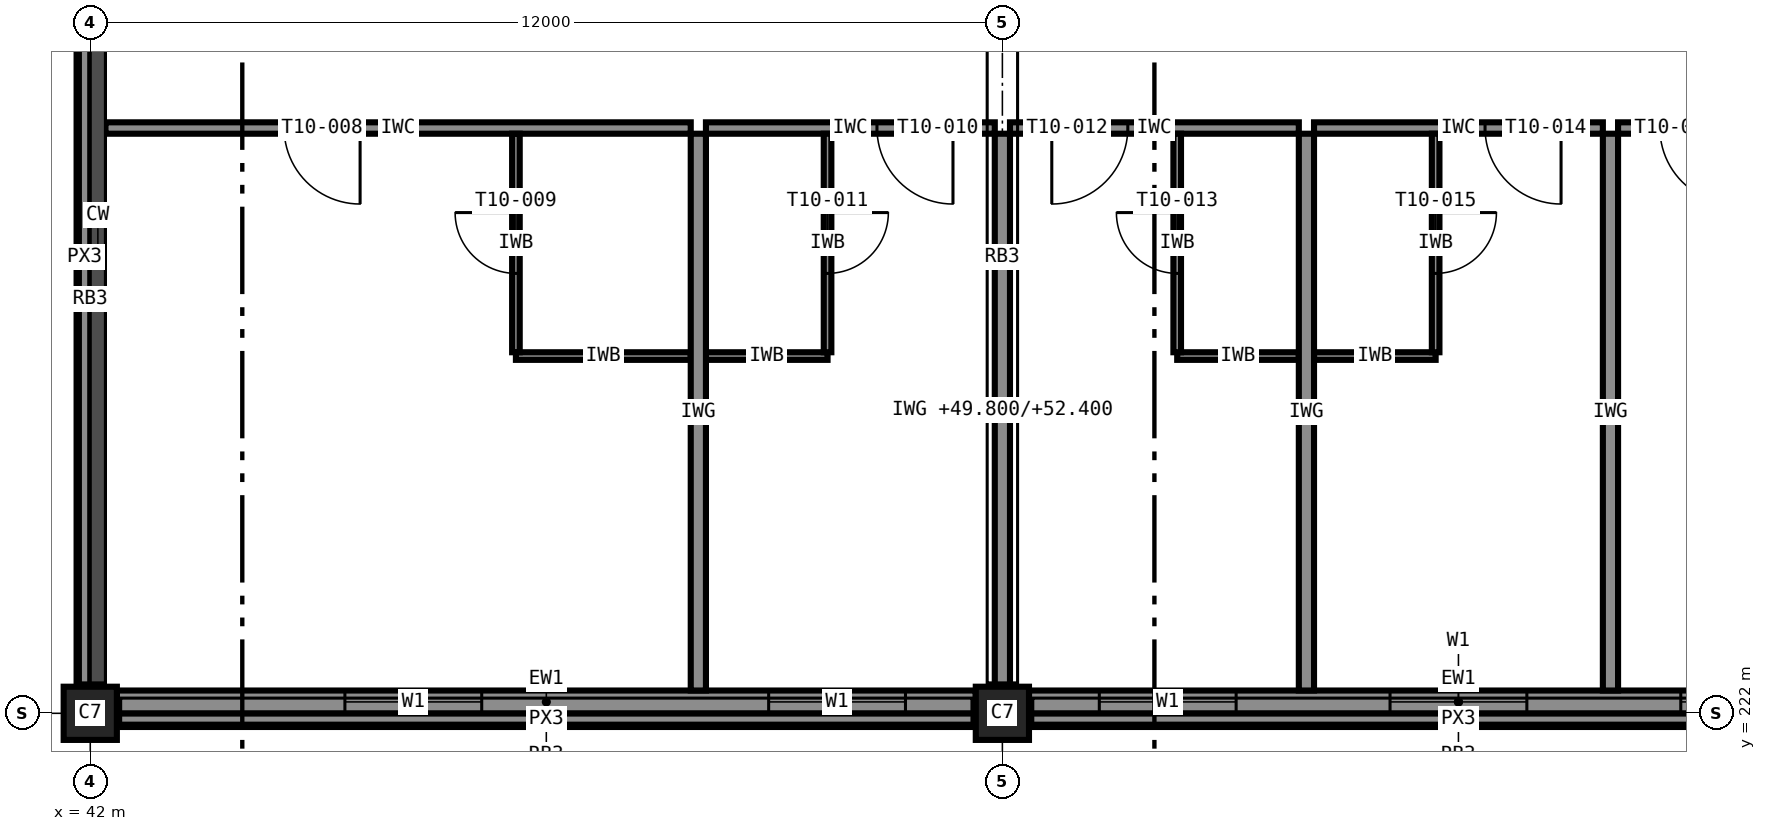
"""IFC4 building model, lengths in metres.
Left out: names, types, materials, properties, quantities, classifications, styles, units other than length and angle.
Written with IfcOpenShell. Run it as: python <this file> out.ifc"""

import sys

from ifc_helpers import new_model, si_unit, direction, frame, frame_2d, origin, origin_2d, place, context, subcontext, project, spatial, rectangle, extrude, element, fill, save


model = new_model("IFC4")
c1 = context("Model", 3, precision=1e-05, world=origin(), true_north=direction((0.0, 1.0)))
c2 = subcontext(c1, "Body", "Model", "MODEL_VIEW")
j1 = project(units=[si_unit("LENGTHUNIT", "METRE"), si_unit("PLANEANGLEUNIT", "RADIAN")], contexts=[c1])
p1 = place(None, origin())
s1 = spatial("IfcSite", under=j1, at=p1, CompositionType="ELEMENT")
p2 = place(p1, origin())
s2 = spatial("IfcBuilding", under=s1, at=p2, CompositionType="ELEMENT")
p3 = place(p2, frame((0.0, 0.0, 49.8)))
s3 = spatial("IfcBuildingStorey", under=s2, at=p3, CompositionType="ELEMENT", Elevation=49.8)
for number, where, z_axis, x_axis in (
    (1, (42.0, 222.0, 0.0), (0.0, 0.0, 1.0), (1.0, 0.0, 0.0)),
    (2, (54.0, 222.0, 0.0), (0.0, 0.0, 1.0), (1.0, 0.0, 0.0)),
):
    element("IfcColumn", number, at=place(p3, frame(where, z_axis=z_axis, x_axis=x_axis)), inside=s3, PredefinedType="COLUMN", context=c2, shape_type="SweptSolid", body=[
        extrude(rectangle(XDim=0.7, YDim=0.7, at=origin_2d()), origin(), (0.0, 0.0, 1.0), 3.6),
    ])
p4 = place(p3, frame((42.35, 222.15, 0.0), z_axis=(0.0, 0.0, 1.0), x_axis=(1.0, 0.0, 0.0)))
e3 = element("IfcWall", 3, at=p4, inside=s3, PredefinedType="STANDARD", context=c2, shape_type="SweptSolid", body=[
    extrude(rectangle(XDim=11.3, YDim=0.3, at=frame_2d((5.65, 0.0))), origin(), (0.0, 0.0, 1.0), 2.6),
])
p5 = place(p4, frame((3.0, 0.0, 0.85)))
e4 = element("IfcOpeningElement", 4, at=p5, cuts=e3, PredefinedType="OPENING", context=c2, shape_type="SweptSolid", body=[
    extrude(rectangle(XDim=1.8, YDim=1.75, at=frame_2d((0.9, 0.875))), frame((0.0, 0.16, 0.0), z_axis=(0.0, -1.0, 0.0), x_axis=(1.0, 0.0, 0.0)), (0.0, 0.0, 1.0), 0.32),
])
p6 = place(p4, frame((8.575, 0.0, 0.85)))
e5 = element("IfcOpeningElement", 5, at=p6, cuts=e3, PredefinedType="OPENING", context=c2, shape_type="SweptSolid", body=[
    extrude(rectangle(XDim=1.8, YDim=1.75, at=frame_2d((0.9, 0.875))), frame((0.0, 0.16, 0.0), z_axis=(0.0, -1.0, 0.0), x_axis=(1.0, 0.0, 0.0)), (0.0, 0.0, 1.0), 0.32),
])
p7 = place(p3, frame((54.35, 222.15, 0.0), z_axis=(0.0, 0.0, 1.0), x_axis=(1.0, 0.0, 0.0)))
e6 = element("IfcWall", 6, at=p7, inside=s3, PredefinedType="STANDARD", context=c2, shape_type="SweptSolid", body=[
    extrude(rectangle(XDim=11.3, YDim=0.3, at=frame_2d((5.65, 0.0))), origin(), (0.0, 0.0, 1.0), 2.6),
])
p8 = place(p7, frame((0.925, 0.0, 0.85)))
e7 = element("IfcOpeningElement", 7, at=p8, cuts=e6, PredefinedType="OPENING", context=c2, shape_type="SweptSolid", body=[
    extrude(rectangle(XDim=1.8, YDim=1.75, at=frame_2d((0.9, 0.875))), frame((0.0, 0.16, 0.0), z_axis=(0.0, -1.0, 0.0), x_axis=(1.0, 0.0, 0.0)), (0.0, 0.0, 1.0), 0.32),
])
p9 = place(p7, frame((4.75, 0.0, 0.85)))
e8 = element("IfcOpeningElement", 8, at=p9, cuts=e6, PredefinedType="OPENING", context=c2, shape_type="SweptSolid", body=[
    extrude(rectangle(XDim=1.8, YDim=1.75, at=frame_2d((0.9, 0.875))), frame((0.0, 0.16, 0.0), z_axis=(0.0, -1.0, 0.0), x_axis=(1.0, 0.0, 0.0)), (0.0, 0.0, 1.0), 0.32),
])
p10 = place(p7, frame((8.575, 0.0, 0.85)))
e9 = element("IfcOpeningElement", 9, at=p10, cuts=e6, PredefinedType="OPENING", context=c2, shape_type="SweptSolid", body=[
    extrude(rectangle(XDim=1.8, YDim=1.75, at=frame_2d((0.9, 0.875))), frame((0.0, 0.16, 0.0), z_axis=(0.0, -1.0, 0.0), x_axis=(1.0, 0.0, 0.0)), (0.0, 0.0, 1.0), 0.32),
])
for number, where, z_axis, x_axis in (
    (10, (42.35, 221.925, 3.4), (0.0, 0.0, 1.0), (1.0, 0.0, 0.0)),
    (11, (54.35, 221.925, 3.4), (0.0, 0.0, 1.0), (1.0, 0.0, 0.0)),
    (12, (41.925, 233.65, 3.4), (0.0, 0.0, 1.0), (0.0, -1.0, 0.0)),
):
    element("IfcWall", number, at=place(p3, frame(where, z_axis=z_axis, x_axis=x_axis)), inside=s3, PredefinedType="STANDARD", context=c2, shape_type="SweptSolid", body=[
        extrude(rectangle(XDim=11.3, YDim=0.15, at=frame_2d((5.65, 0.0))), origin(), (0.0, 0.0, 1.0), 0.2),
    ])
p11 = place(p3, frame((49.9, 229.7, 0.0), z_axis=(0.0, 0.0, 1.0), x_axis=(-1.0, 0.0, 0.0)))
e13 = element("IfcWall", 13, at=p11, inside=s3, PredefinedType="PARTITIONING", context=c2, shape_type="SweptSolid", body=[
    extrude(rectangle(XDim=7.7, YDim=0.15, at=frame_2d((3.85, 0.0))), origin(), (0.0, 0.0, 1.0), 3.4),
])
p12 = place(p11, frame((4.35, 0.0, 0.0)))
e14 = element("IfcOpeningElement", 14, at=p12, cuts=e13, PredefinedType="OPENING", context=c2, shape_type="SweptSolid", body=[
    extrude(rectangle(XDim=1.0, YDim=2.1, at=frame_2d((0.5, 1.05))), frame((0.0, 0.085, 0.0), z_axis=(0.0, -1.0, 0.0), x_axis=(1.0, 0.0, 0.0)), (0.0, 0.0, 1.0), 0.17),
])
p13 = place(p3, frame((47.6, 226.7, 0.0), z_axis=(0.0, 0.0, 1.0), x_axis=(1.0, 0.0, 0.0)))
e15 = element("IfcWall", 15, at=p13, inside=s3, PredefinedType="PARTITIONING", context=c2, shape_type="SweptSolid", body=[
    extrude(rectangle(XDim=2.3, YDim=0.1, at=frame_2d((1.15, 0.0))), origin(), (0.0, 0.0, 1.0), 3.4),
])
p14 = place(p3, frame((47.6, 226.75, 0.0), z_axis=(0.0, 0.0, 1.0), x_axis=(0.0, 1.0, 0.0)))
e16 = element("IfcWall", 16, at=p14, inside=s3, PredefinedType="PARTITIONING", context=c2, shape_type="SweptSolid", body=[
    extrude(rectangle(XDim=2.875, YDim=0.1, at=frame_2d((1.438, 0.0))), origin(), (0.0, 0.0, 1.0), 3.4),
])
p15 = place(p14, frame((1.038, 0.0, 0.0)))
e17 = element("IfcOpeningElement", 17, at=p15, cuts=e16, PredefinedType="OPENING", context=c2, shape_type="SweptSolid", body=[
    extrude(rectangle(XDim=0.8, YDim=2.1, at=frame_2d((0.4, 1.05))), frame((0.0, 0.06, 0.0), z_axis=(0.0, -1.0, 0.0), x_axis=(1.0, 0.0, 0.0)), (0.0, 0.0, 1.0), 0.12),
])
p16 = place(p3, frame((53.9, 229.7, 0.0), z_axis=(0.0, 0.0, 1.0), x_axis=(-1.0, 0.0, 0.0)))
e18 = element("IfcWall", 18, at=p16, inside=s3, PredefinedType="PARTITIONING", context=c2, shape_type="SweptSolid", body=[
    extrude(rectangle(XDim=3.8, YDim=0.15, at=frame_2d((1.9, 0.0))), origin(), (0.0, 0.0, 1.0), 3.4),
])
p17 = place(p16, frame((0.55, 0.0, 0.0)))
e19 = element("IfcOpeningElement", 19, at=p17, cuts=e18, PredefinedType="OPENING", context=c2, shape_type="SweptSolid", body=[
    extrude(rectangle(XDim=1.0, YDim=2.1, at=frame_2d((0.5, 1.05))), frame((0.0, 0.085, 0.0), z_axis=(0.0, -1.0, 0.0), x_axis=(1.0, 0.0, 0.0)), (0.0, 0.0, 1.0), 0.17),
])
p18 = place(p3, frame((50.1, 226.7, 0.0), z_axis=(0.0, 0.0, 1.0), x_axis=(1.0, 0.0, 0.0)))
e20 = element("IfcWall", 20, at=p18, inside=s3, PredefinedType="PARTITIONING", context=c2, shape_type="SweptSolid", body=[
    extrude(rectangle(XDim=1.6, YDim=0.1, at=frame_2d((0.8, 0.0))), origin(), (0.0, 0.0, 1.0), 3.4),
])
p19 = place(p3, frame((51.7, 229.625, 0.0), z_axis=(0.0, 0.0, 1.0), x_axis=(0.0, -1.0, 0.0)))
e21 = element("IfcWall", 21, at=p19, inside=s3, PredefinedType="PARTITIONING", context=c2, shape_type="SweptSolid", body=[
    extrude(rectangle(XDim=2.875, YDim=0.1, at=frame_2d((1.438, 0.0))), origin(), (0.0, 0.0, 1.0), 3.4),
])
p20 = place(p19, frame((1.038, 0.0, 0.0)))
e22 = element("IfcOpeningElement", 22, at=p20, cuts=e21, PredefinedType="OPENING", context=c2, shape_type="SweptSolid", body=[
    extrude(rectangle(XDim=0.8, YDim=2.1, at=frame_2d((0.4, 1.05))), frame((0.0, 0.06, 0.0), z_axis=(0.0, -1.0, 0.0), x_axis=(1.0, 0.0, 0.0)), (0.0, 0.0, 1.0), 0.12),
])
p21 = place(p3, frame((57.9, 229.7, 0.0), z_axis=(0.0, 0.0, 1.0), x_axis=(-1.0, 0.0, 0.0)))
e23 = element("IfcWall", 23, at=p21, inside=s3, PredefinedType="PARTITIONING", context=c2, shape_type="SweptSolid", body=[
    extrude(rectangle(XDim=3.8, YDim=0.15, at=frame_2d((1.9, 0.0))), origin(), (0.0, 0.0, 1.0), 3.4),
])
p22 = place(p21, frame((2.25, 0.0, 0.0)))
e24 = element("IfcOpeningElement", 24, at=p22, cuts=e23, PredefinedType="OPENING", context=c2, shape_type="SweptSolid", body=[
    extrude(rectangle(XDim=1.0, YDim=2.1, at=frame_2d((0.5, 1.05))), frame((0.0, 0.085, 0.0), z_axis=(0.0, -1.0, 0.0), x_axis=(1.0, 0.0, 0.0)), (0.0, 0.0, 1.0), 0.17),
])
p23 = place(p3, frame((56.3, 226.7, 0.0), z_axis=(0.0, 0.0, 1.0), x_axis=(1.0, 0.0, 0.0)))
e25 = element("IfcWall", 25, at=p23, inside=s3, PredefinedType="PARTITIONING", context=c2, shape_type="SweptSolid", body=[
    extrude(rectangle(XDim=1.6, YDim=0.1, at=frame_2d((0.8, 0.0))), origin(), (0.0, 0.0, 1.0), 3.4),
])
p24 = place(p3, frame((56.3, 226.75, 0.0), z_axis=(0.0, 0.0, 1.0), x_axis=(0.0, 1.0, 0.0)))
e26 = element("IfcWall", 26, at=p24, inside=s3, PredefinedType="PARTITIONING", context=c2, shape_type="SweptSolid", body=[
    extrude(rectangle(XDim=2.875, YDim=0.1, at=frame_2d((1.438, 0.0))), origin(), (0.0, 0.0, 1.0), 3.4),
])
p25 = place(p24, frame((1.038, 0.0, 0.0)))
e27 = element("IfcOpeningElement", 27, at=p25, cuts=e26, PredefinedType="OPENING", context=c2, shape_type="SweptSolid", body=[
    extrude(rectangle(XDim=0.8, YDim=2.1, at=frame_2d((0.4, 1.05))), frame((0.0, 0.06, 0.0), z_axis=(0.0, -1.0, 0.0), x_axis=(1.0, 0.0, 0.0)), (0.0, 0.0, 1.0), 0.12),
])
p26 = place(p3, frame((61.9, 229.7, 0.0), z_axis=(0.0, 0.0, 1.0), x_axis=(-1.0, 0.0, 0.0)))
e28 = element("IfcWall", 28, at=p26, inside=s3, PredefinedType="PARTITIONING", context=c2, shape_type="SweptSolid", body=[
    extrude(rectangle(XDim=3.8, YDim=0.15, at=frame_2d((1.9, 0.0))), origin(), (0.0, 0.0, 1.0), 3.4),
])
p27 = place(p26, frame((0.55, 0.0, 0.0)))
e29 = element("IfcOpeningElement", 29, at=p27, cuts=e28, PredefinedType="OPENING", context=c2, shape_type="SweptSolid", body=[
    extrude(rectangle(XDim=1.0, YDim=2.1, at=frame_2d((0.5, 1.05))), frame((0.0, 0.085, 0.0), z_axis=(0.0, -1.0, 0.0), x_axis=(1.0, 0.0, 0.0)), (0.0, 0.0, 1.0), 0.17),
])
p28 = place(p3, frame((58.1, 226.7, 0.0), z_axis=(0.0, 0.0, 1.0), x_axis=(1.0, 0.0, 0.0)))
e30 = element("IfcWall", 30, at=p28, inside=s3, PredefinedType="PARTITIONING", context=c2, shape_type="SweptSolid", body=[
    extrude(rectangle(XDim=1.6, YDim=0.1, at=frame_2d((0.8, 0.0))), origin(), (0.0, 0.0, 1.0), 3.4),
])
p29 = place(p3, frame((59.7, 229.625, 0.0), z_axis=(0.0, 0.0, 1.0), x_axis=(0.0, -1.0, 0.0)))
e31 = element("IfcWall", 31, at=p29, inside=s3, PredefinedType="PARTITIONING", context=c2, shape_type="SweptSolid", body=[
    extrude(rectangle(XDim=2.875, YDim=0.1, at=frame_2d((1.438, 0.0))), origin(), (0.0, 0.0, 1.0), 3.4),
])
p30 = place(p29, frame((1.038, 0.0, 0.0)))
e32 = element("IfcOpeningElement", 32, at=p30, cuts=e31, PredefinedType="OPENING", context=c2, shape_type="SweptSolid", body=[
    extrude(rectangle(XDim=0.8, YDim=2.1, at=frame_2d((0.4, 1.05))), frame((0.0, 0.06, 0.0), z_axis=(0.0, -1.0, 0.0), x_axis=(1.0, 0.0, 0.0)), (0.0, 0.0, 1.0), 0.12),
])
p31 = place(p3, frame((65.9, 229.7, 0.0), z_axis=(0.0, 0.0, 1.0), x_axis=(-1.0, 0.0, 0.0)))
e33 = element("IfcWall", 33, at=p31, inside=s3, PredefinedType="PARTITIONING", context=c2, shape_type="SweptSolid", body=[
    extrude(rectangle(XDim=3.8, YDim=0.15, at=frame_2d((1.9, 0.0))), origin(), (0.0, 0.0, 1.0), 3.4),
])
p32 = place(p31, frame((2.25, 0.0, 0.0)))
e34 = element("IfcOpeningElement", 34, at=p32, cuts=e33, PredefinedType="OPENING", context=c2, shape_type="SweptSolid", body=[
    extrude(rectangle(XDim=1.0, YDim=2.1, at=frame_2d((0.5, 1.05))), frame((0.0, 0.085, 0.0), z_axis=(0.0, -1.0, 0.0), x_axis=(1.0, 0.0, 0.0)), (0.0, 0.0, 1.0), 0.17),
])
p33 = place(p3, frame((50.0, 222.3, 0.0), z_axis=(0.0, 0.0, 1.0), x_axis=(0.0, 1.0, 0.0)))
e35 = element("IfcWall", 35, at=p33, inside=s3, PredefinedType="PARTITIONING", context=c2, shape_type="SweptSolid", body=[
    extrude(rectangle(XDim=7.325, YDim=0.2, at=frame_2d((3.663, 0.0))), origin(), (0.0, 0.0, 1.0), 3.4),
])
p34 = place(p3, frame((54.0, 222.35, 0.0), z_axis=(0.0, 0.0, 1.0), x_axis=(0.0, 1.0, 0.0)))
e36 = element("IfcWall", 36, at=p34, inside=s3, PredefinedType="PARTITIONING", context=c2, shape_type="SweptSolid", body=[
    extrude(rectangle(XDim=7.275, YDim=0.2, at=frame_2d((3.637, 0.0))), origin(), (0.0, 0.0, 1.0), 2.6),
])
for number, where, z_axis, x_axis in (
    (37, (58.0, 222.3, 0.0), (0.0, 0.0, 1.0), (0.0, 1.0, 0.0)),
    (38, (62.0, 222.3, 0.0), (0.0, 0.0, 1.0), (0.0, 1.0, 0.0)),
):
    element("IfcWall", number, at=place(p3, frame(where, z_axis=z_axis, x_axis=x_axis)), inside=s3, PredefinedType="PARTITIONING", context=c2, shape_type="SweptSolid", body=[
        extrude(rectangle(XDim=7.325, YDim=0.2, at=frame_2d((3.663, 0.0))), origin(), (0.0, 0.0, 1.0), 3.4),
    ])
p35 = place(p5, origin())
e39 = element("IfcWindow", 39, at=p35, inside=s3, PartitioningType="SINGLE_PANEL", PredefinedType="WINDOW", context=c2, shape_type="SweptSolid", body=[
    extrude(rectangle(XDim=1.8, YDim=1.75, at=frame_2d((0.9, 0.875))), frame((0.0, 0.03, 0.0), z_axis=(0.0, -1.0, 0.0), x_axis=(1.0, 0.0, 0.0)), (0.0, 0.0, 1.0), 0.06),
])
fill(e4, e39)
p36 = place(p6, origin())
e40 = element("IfcWindow", 40, at=p36, inside=s3, PartitioningType="SINGLE_PANEL", PredefinedType="WINDOW", context=c2, shape_type="SweptSolid", body=[
    extrude(rectangle(XDim=1.8, YDim=1.75, at=frame_2d((0.9, 0.875))), frame((0.0, 0.03, 0.0), z_axis=(0.0, -1.0, 0.0), x_axis=(1.0, 0.0, 0.0)), (0.0, 0.0, 1.0), 0.06),
])
fill(e5, e40)
p37 = place(p8, origin())
e41 = element("IfcWindow", 41, at=p37, inside=s3, PartitioningType="SINGLE_PANEL", PredefinedType="WINDOW", context=c2, shape_type="SweptSolid", body=[
    extrude(rectangle(XDim=1.8, YDim=1.75, at=frame_2d((0.9, 0.875))), frame((0.0, 0.03, 0.0), z_axis=(0.0, -1.0, 0.0), x_axis=(1.0, 0.0, 0.0)), (0.0, 0.0, 1.0), 0.06),
])
fill(e7, e41)
p38 = place(p9, origin())
e42 = element("IfcWindow", 42, at=p38, inside=s3, PartitioningType="SINGLE_PANEL", PredefinedType="WINDOW", context=c2, shape_type="SweptSolid", body=[
    extrude(rectangle(XDim=1.8, YDim=1.75, at=frame_2d((0.9, 0.875))), frame((0.0, 0.03, 0.0), z_axis=(0.0, -1.0, 0.0), x_axis=(1.0, 0.0, 0.0)), (0.0, 0.0, 1.0), 0.06),
])
fill(e8, e42)
p39 = place(p10, origin())
e43 = element("IfcWindow", 43, at=p39, inside=s3, PartitioningType="SINGLE_PANEL", PredefinedType="WINDOW", context=c2, shape_type="SweptSolid", body=[
    extrude(rectangle(XDim=1.8, YDim=1.75, at=frame_2d((0.9, 0.875))), frame((0.0, 0.03, 0.0), z_axis=(0.0, -1.0, 0.0), x_axis=(1.0, 0.0, 0.0)), (0.0, 0.0, 1.0), 0.06),
])
fill(e9, e43)
p40 = place(p12, origin())
e44 = element("IfcDoor", 44, at=p40, inside=s3, OperationType="SINGLE_SWING_LEFT", PredefinedType="DOOR", context=c2, shape_type="SweptSolid", body=[
    extrude(rectangle(XDim=1.0, YDim=2.1, at=frame_2d((0.5, 1.05))), frame((0.0, 0.025, 0.0), z_axis=(0.0, -1.0, 0.0), x_axis=(1.0, 0.0, 0.0)), (0.0, 0.0, 1.0), 0.05),
])
fill(e14, e44)
p41 = place(p15, origin())
e45 = element("IfcDoor", 45, at=p41, inside=s3, OperationType="SINGLE_SWING_RIGHT", PredefinedType="DOOR", context=c2, shape_type="SweptSolid", body=[
    extrude(rectangle(XDim=0.8, YDim=2.1, at=frame_2d((0.4, 1.05))), frame((0.0, 0.025, 0.0), z_axis=(0.0, -1.0, 0.0), x_axis=(1.0, 0.0, 0.0)), (0.0, 0.0, 1.0), 0.05),
])
fill(e17, e45)
p42 = place(p17, origin())
e46 = element("IfcDoor", 46, at=p42, inside=s3, OperationType="SINGLE_SWING_LEFT", PredefinedType="DOOR", context=c2, shape_type="SweptSolid", body=[
    extrude(rectangle(XDim=1.0, YDim=2.1, at=frame_2d((0.5, 1.05))), frame((0.0, 0.025, 0.0), z_axis=(0.0, -1.0, 0.0), x_axis=(1.0, 0.0, 0.0)), (0.0, 0.0, 1.0), 0.05),
])
fill(e19, e46)
p43 = place(p20, origin())
e47 = element("IfcDoor", 47, at=p43, inside=s3, OperationType="SINGLE_SWING_LEFT", PredefinedType="DOOR", context=c2, shape_type="SweptSolid", body=[
    extrude(rectangle(XDim=0.8, YDim=2.1, at=frame_2d((0.4, 1.05))), frame((0.0, 0.025, 0.0), z_axis=(0.0, -1.0, 0.0), x_axis=(1.0, 0.0, 0.0)), (0.0, 0.0, 1.0), 0.05),
])
fill(e22, e47)
p44 = place(p22, origin())
e48 = element("IfcDoor", 48, at=p44, inside=s3, OperationType="SINGLE_SWING_RIGHT", PredefinedType="DOOR", context=c2, shape_type="SweptSolid", body=[
    extrude(rectangle(XDim=1.0, YDim=2.1, at=frame_2d((0.5, 1.05))), frame((0.0, 0.025, 0.0), z_axis=(0.0, -1.0, 0.0), x_axis=(1.0, 0.0, 0.0)), (0.0, 0.0, 1.0), 0.05),
])
fill(e24, e48)
p45 = place(p25, origin())
e49 = element("IfcDoor", 49, at=p45, inside=s3, OperationType="SINGLE_SWING_RIGHT", PredefinedType="DOOR", context=c2, shape_type="SweptSolid", body=[
    extrude(rectangle(XDim=0.8, YDim=2.1, at=frame_2d((0.4, 1.05))), frame((0.0, 0.025, 0.0), z_axis=(0.0, -1.0, 0.0), x_axis=(1.0, 0.0, 0.0)), (0.0, 0.0, 1.0), 0.05),
])
fill(e27, e49)
p46 = place(p27, origin())
e50 = element("IfcDoor", 50, at=p46, inside=s3, OperationType="SINGLE_SWING_LEFT", PredefinedType="DOOR", context=c2, shape_type="SweptSolid", body=[
    extrude(rectangle(XDim=1.0, YDim=2.1, at=frame_2d((0.5, 1.05))), frame((0.0, 0.025, 0.0), z_axis=(0.0, -1.0, 0.0), x_axis=(1.0, 0.0, 0.0)), (0.0, 0.0, 1.0), 0.05),
])
fill(e29, e50)
p47 = place(p30, origin())
e51 = element("IfcDoor", 51, at=p47, inside=s3, OperationType="SINGLE_SWING_LEFT", PredefinedType="DOOR", context=c2, shape_type="SweptSolid", body=[
    extrude(rectangle(XDim=0.8, YDim=2.1, at=frame_2d((0.4, 1.05))), frame((0.0, 0.025, 0.0), z_axis=(0.0, -1.0, 0.0), x_axis=(1.0, 0.0, 0.0)), (0.0, 0.0, 1.0), 0.05),
])
fill(e32, e51)
p48 = place(p32, origin())
e52 = element("IfcDoor", 52, at=p48, inside=s3, OperationType="SINGLE_SWING_LEFT", PredefinedType="DOOR", context=c2, shape_type="SweptSolid", body=[
    extrude(rectangle(XDim=1.0, YDim=2.1, at=frame_2d((0.5, 1.05))), frame((0.0, 0.025, 0.0), z_axis=(0.0, -1.0, 0.0), x_axis=(1.0, 0.0, 0.0)), (0.0, 0.0, 1.0), 0.05),
])
fill(e34, e52)
save(model, sys.argv[1])
